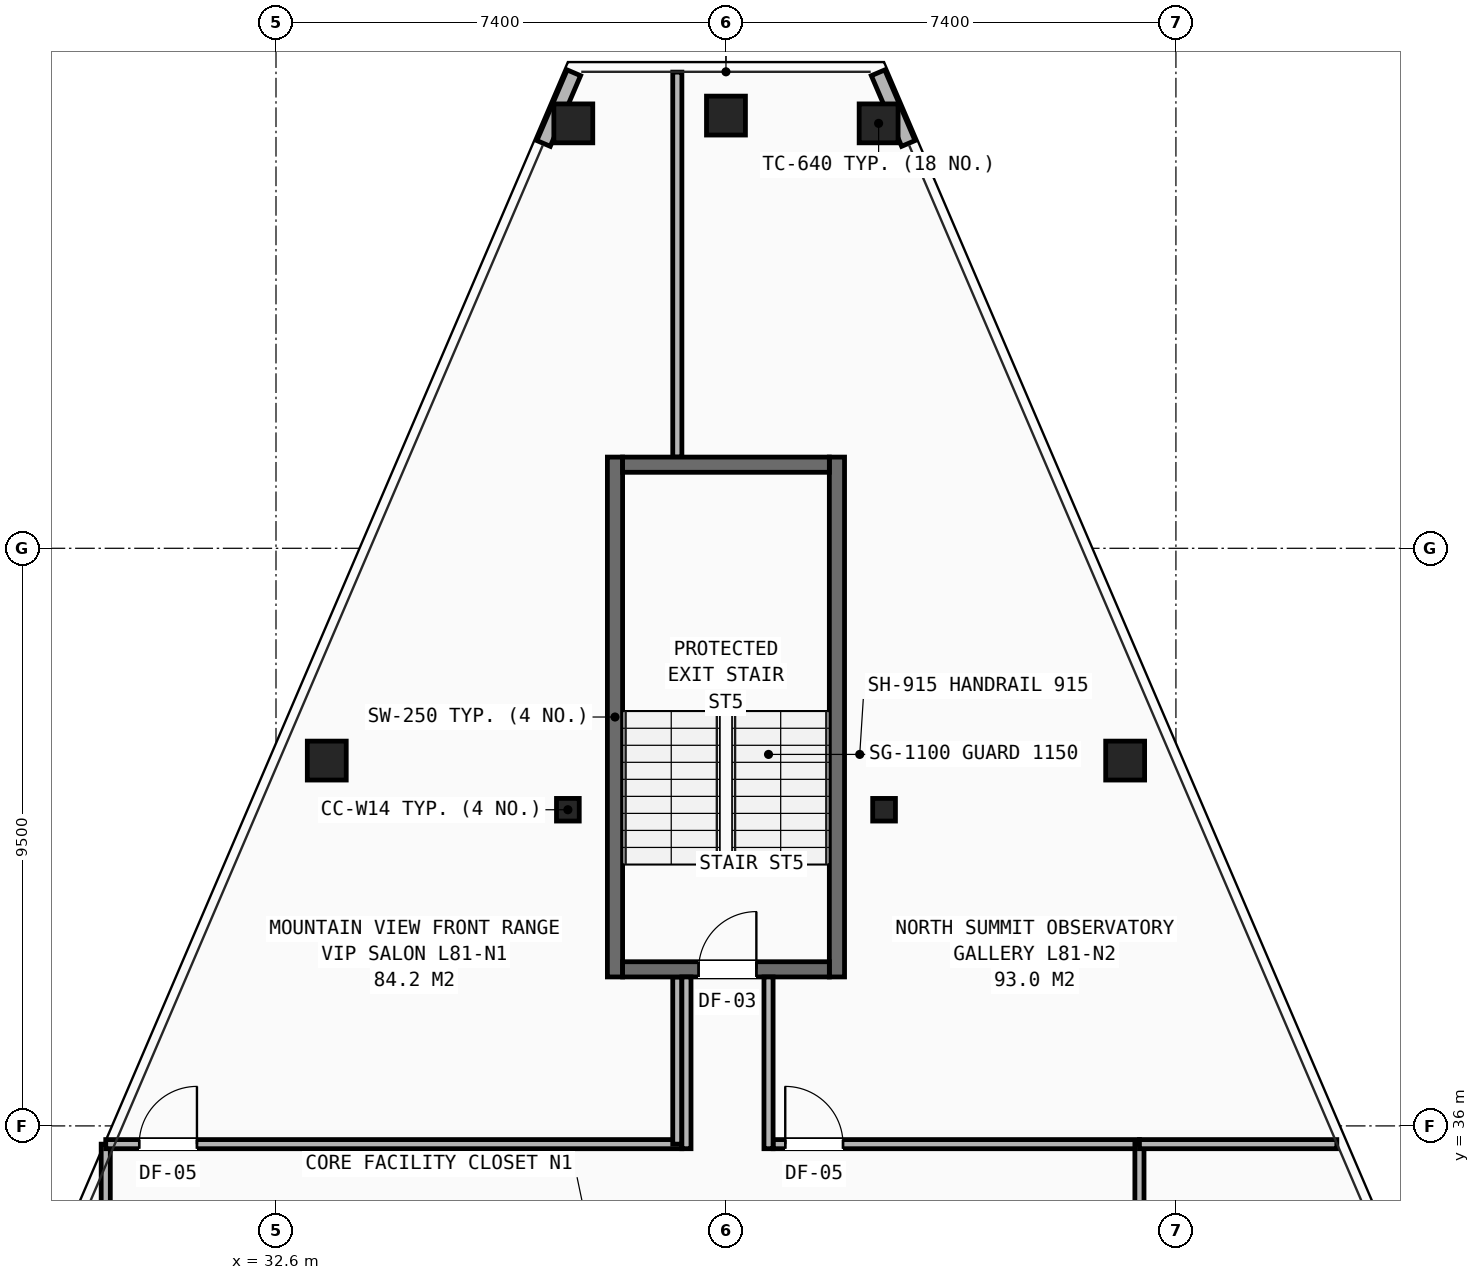
"""IFC4 building model, lengths in metres.
Left out: names, types, materials, properties, quantities, classifications, styles, units other than length and angle.
Written with IfcOpenShell. Run it as: python <this file> out.ifc"""

import sys

from ifc_helpers import new_model, si_unit, direction, frame, frame_2d, origin, origin_2d, place, context, subcontext, project, spatial, rectangle, hollow_rectangle, i_section, extrude, element, fill, save


model = new_model("IFC4")
c1 = context("Model", 3, precision=1e-05, world=origin(), true_north=direction((0.0, 1.0)))
c2 = subcontext(c1, "Body", "Model", "MODEL_VIEW")
j1 = project(units=[si_unit("LENGTHUNIT", "METRE"), si_unit("PLANEANGLEUNIT", "RADIAN")], contexts=[c1])
p1 = place(None, origin())
s1 = spatial("IfcSite", under=j1, at=p1, CompositionType="ELEMENT")
p2 = place(p1, origin())
s2 = spatial("IfcBuilding", under=s1, at=p2, CompositionType="ELEMENT")
p3 = place(p2, frame((0.0, 0.0, 286.5)))
s3 = spatial("IfcBuildingStorey", under=s2, at=p3, CompositionType="ELEMENT", Elevation=286.5)
for number, where, z_axis, x_axis in (
    (1, (37.4, 41.2, 0.0), (0.0, 0.0, 1.0), (1.0, 0.0, 0.0)),
    (2, (42.6, 41.2, 0.0), (0.0, 0.0, 1.0), (1.0, 0.0, 0.0)),
):
    element("IfcColumn", number, at=place(p3, frame(where, z_axis=z_axis, x_axis=x_axis)), inside=s3, PredefinedType="COLUMN", context=c2, shape_type="SweptSolid", body=[
        extrude(i_section(OverallWidth=0.374, OverallDepth=0.372, WebThickness=0.016, FlangeThickness=0.026, at=origin_2d()), origin(), (0.0, 0.0, 1.0), 3.5),
    ])
for number, where, z_axis, x_axis in (
    (3, (42.51, 52.489, 0.0), (0.0, 0.0, 1.0), (1.0, 0.0, 0.0)),
    (4, (40.0, 52.617, 0.0), (0.0, 0.0, 1.0), (1.0, 0.0, 0.0)),
    (5, (37.49, 52.489, 0.0), (0.0, 0.0, 1.0), (1.0, 0.0, 0.0)),
    (6, (33.435, 42.009, 0.0), (0.0, 0.0, 1.0), (1.0, 0.0, 0.0)),
    (7, (46.565, 42.009, 0.0), (0.0, 0.0, 1.0), (1.0, 0.0, 0.0)),
):
    element("IfcColumn", number, at=place(p3, frame(where, z_axis=z_axis, x_axis=x_axis)), inside=s3, PredefinedType="COLUMN", context=c2, shape_type="SweptSolid", body=[
        extrude(hollow_rectangle(XDim=0.64, YDim=0.64, WallThickness=0.045, at=origin_2d()), origin(), (0.0, 0.0, 1.0), 3.5),
    ])
for number, where, z_axis, x_axis in (
    (8, (37.499, 53.321, 0.0), (0.0, 0.0, 1.0), (-0.394, -0.919, 0.0)),
    (9, (43.0, 52.158, 0.0), (0.0, 0.0, 1.0), (-0.394, 0.919, 0.0)),
):
    element("IfcWall", number, at=place(p3, frame(where, z_axis=z_axis, x_axis=x_axis)), inside=s3, PredefinedType="SHEAR", context=c2, shape_type="SweptSolid", body=[
        extrude(rectangle(XDim=1.265, YDim=0.24, at=frame_2d((0.632, 0.0))), origin(), (0.0, 0.0, 1.0), 2.573),
    ])
p4 = place(p3, frame((29.8, 16.4, 0.0), z_axis=(0.0, 0.0, 1.0), x_axis=(0.0, 1.0, 0.0)))
e10 = element("IfcWall", 10, at=p4, inside=s3, PredefinedType="PARTITIONING", context=c2, shape_type="SweptSolid", body=[
    extrude(rectangle(XDim=19.3, YDim=0.15, at=frame_2d((9.65, 0.0))), origin(), (0.0, 0.0, 1.0), 2.242),
])
p5 = place(p4, frame((0.35, 0.0, 0.0)))
e11 = element("IfcOpeningElement", 11, at=p5, cuts=e10, PredefinedType="OPENING", context=c2, shape_type="SweptSolid", body=[
    extrude(rectangle(XDim=0.95, YDim=2.1, at=frame_2d((0.475, 1.05))), frame((0.0, 0.085, 0.0), z_axis=(0.0, -1.0, 0.0), x_axis=(1.0, 0.0, 0.0)), (0.0, 0.0, 1.0), 0.17),
])
p6 = place(p4, frame((9.95, 0.0, 0.0)))
e12 = element("IfcOpeningElement", 12, at=p6, cuts=e10, PredefinedType="OPENING", context=c2, shape_type="SweptSolid", body=[
    extrude(rectangle(XDim=0.95, YDim=2.1, at=frame_2d((0.475, 1.05))), frame((0.0, 0.085, 0.0), z_axis=(0.0, -1.0, 0.0), x_axis=(1.0, 0.0, 0.0)), (0.0, 0.0, 1.0), 0.17),
])
p7 = place(p3, frame((29.8, 35.7, 0.0), z_axis=(0.0, 0.0, 1.0), x_axis=(1.0, 0.0, 0.0)))
e13 = element("IfcWall", 13, at=p7, inside=s3, PredefinedType="PARTITIONING", context=c2, shape_type="SweptSolid", body=[
    extrude(rectangle(XDim=9.475, YDim=0.15, at=frame_2d((4.737, 0.0))), origin(), (0.0, 0.0, 1.0), 2.578),
])
p8 = place(p7, frame((0.55, 0.0, 0.0)))
e14 = element("IfcOpeningElement", 14, at=p8, cuts=e13, PredefinedType="OPENING", context=c2, shape_type="SweptSolid", body=[
    extrude(rectangle(XDim=0.95, YDim=2.1, at=frame_2d((0.475, 1.05))), frame((0.0, 0.085, 0.0), z_axis=(0.0, -1.0, 0.0), x_axis=(1.0, 0.0, 0.0)), (0.0, 0.0, 1.0), 0.17),
])
p9 = place(p3, frame((40.775, 35.7, 0.0), z_axis=(0.0, 0.0, 1.0), x_axis=(1.0, 0.0, 0.0)))
e15 = element("IfcWall", 15, at=p9, inside=s3, PredefinedType="PARTITIONING", context=c2, shape_type="SweptSolid", body=[
    extrude(rectangle(XDim=6.025, YDim=0.15, at=frame_2d((3.013, 0.0))), origin(), (0.0, 0.0, 1.0), 2.783),
])
p10 = place(p9, frame((0.2, 0.0, 0.0)))
e16 = element("IfcOpeningElement", 16, at=p10, cuts=e15, PredefinedType="OPENING", context=c2, shape_type="SweptSolid", body=[
    extrude(rectangle(XDim=0.95, YDim=2.1, at=frame_2d((0.475, 1.05))), frame((0.0, 0.085, 0.0), z_axis=(0.0, -1.0, 0.0), x_axis=(1.0, 0.0, 0.0)), (0.0, 0.0, 1.0), 0.17),
])
p11 = place(p3, frame((46.8, 31.2, 0.0), z_axis=(0.0, 0.0, 1.0), x_axis=(0.0, 1.0, 0.0)))
e17 = element("IfcWall", 17, at=p11, inside=s3, PredefinedType="PARTITIONING", context=c2, shape_type="SweptSolid", body=[
    extrude(rectangle(XDim=4.5, YDim=0.15, at=frame_2d((2.25, 0.0))), origin(), (0.0, 0.0, 1.0), 2.655),
])
p12 = place(p3, frame((46.8, 35.7, 0.0), z_axis=(0.0, 0.0, 1.0), x_axis=(1.0, 0.0, 0.0)))
e18 = element("IfcWall", 18, at=p12, inside=s3, PredefinedType="PARTITIONING", context=c2, shape_type="SweptSolid", body=[
    extrude(rectangle(XDim=3.246, YDim=0.15, at=frame_2d((1.623, 0.0))), origin(), (0.0, 0.0, 1.0), 2.578),
])
p13 = place(p3, frame((39.2, 35.7, 0.0), z_axis=(0.0, 0.0, 1.0), x_axis=(0.0, 1.0, 0.0)))
e19 = element("IfcWall", 19, at=p13, inside=s3, PredefinedType="PARTITIONING", context=c2, shape_type="SweptSolid", body=[
    extrude(rectangle(XDim=2.75, YDim=0.15, at=frame_2d((1.375, 0.0))), origin(), (0.0, 0.0, 1.0), 3.2),
])
p14 = place(p3, frame((39.2, 47.0, 0.0), z_axis=(0.0, 0.0, 1.0), x_axis=(0.0, 1.0, 0.0)))
e20 = element("IfcWall", 20, at=p14, inside=s3, PredefinedType="PARTITIONING", context=c2, shape_type="SweptSolid", body=[
    extrude(rectangle(XDim=6.332, YDim=0.15, at=frame_2d((3.166, 0.0))), origin(), (0.0, 0.0, 1.0), 2.578),
])
for number, where, z_axis, x_axis in (
    (21, (38.175, 38.45, 0.0), (0.0, 0.0, 1.0), (0.0, 1.0, 0.0)),
    (22, (41.825, 38.45, 0.0), (0.0, 0.0, 1.0), (0.0, 1.0, 0.0)),
):
    element("IfcWall", number, at=place(p3, frame(where, z_axis=z_axis, x_axis=x_axis)), inside=s3, PredefinedType="SHEAR", context=c2, shape_type="SweptSolid", body=[
        extrude(rectangle(XDim=8.55, YDim=0.25, at=frame_2d((4.275, 0.0))), origin(), (0.0, 0.0, 1.0), 3.2),
    ])
p15 = place(p3, frame((38.3, 38.575, 0.0), z_axis=(0.0, 0.0, 1.0), x_axis=(1.0, 0.0, 0.0)))
e23 = element("IfcWall", 23, at=p15, inside=s3, PredefinedType="SHEAR", context=c2, shape_type="SweptSolid", body=[
    extrude(rectangle(XDim=3.4, YDim=0.25, at=frame_2d((1.7, 0.0))), origin(), (0.0, 0.0, 1.0), 3.2),
])
p16 = place(p15, frame((1.25, 0.0, 0.0)))
e24 = element("IfcOpeningElement", 24, at=p16, cuts=e23, PredefinedType="OPENING", context=c2, shape_type="SweptSolid", body=[
    extrude(rectangle(XDim=0.95, YDim=2.1, at=frame_2d((0.475, 1.05))), frame((0.0, 0.135, 0.0), z_axis=(0.0, -1.0, 0.0), x_axis=(1.0, 0.0, 0.0)), (0.0, 0.0, 1.0), 0.27),
])
p17 = place(p3, frame((38.3, 46.875, 0.0), z_axis=(0.0, 0.0, 1.0), x_axis=(1.0, 0.0, 0.0)))
e25 = element("IfcWall", 25, at=p17, inside=s3, PredefinedType="SHEAR", context=c2, shape_type="SweptSolid", body=[
    extrude(rectangle(XDim=3.4, YDim=0.25, at=frame_2d((1.7, 0.0))), origin(), (0.0, 0.0, 1.0), 3.2),
])
for number, where, z_axis, x_axis in (
    (26, (39.35, 35.625, 0.0), (0.0, 0.0, 1.0), (0.0, 1.0, 0.0)),
    (27, (40.7, 35.625, 0.0), (0.0, 0.0, 1.0), (0.0, 1.0, 0.0)),
):
    element("IfcWall", number, at=place(p3, frame(where, z_axis=z_axis, x_axis=x_axis)), inside=s3, PredefinedType="PARTITIONING", context=c2, shape_type="SweptSolid", body=[
        extrude(rectangle(XDim=2.825, YDim=0.15, at=frame_2d((1.413, 0.0))), origin(), (0.0, 0.0, 1.0), 3.2),
    ])
p18 = place(p8, origin())
e28 = element("IfcDoor", 28, at=p18, inside=s3, OperationType="SINGLE_SWING_RIGHT", PredefinedType="DOOR", context=c2, shape_type="SweptSolid", body=[
    extrude(rectangle(XDim=0.95, YDim=2.1, at=frame_2d((0.475, 1.05))), frame((0.0, 0.025, 0.0), z_axis=(0.0, -1.0, 0.0), x_axis=(1.0, 0.0, 0.0)), (0.0, 0.0, 1.0), 0.05),
])
fill(e14, e28)
p19 = place(p10, origin())
e29 = element("IfcDoor", 29, at=p19, inside=s3, OperationType="SINGLE_SWING_LEFT", PredefinedType="DOOR", context=c2, shape_type="SweptSolid", body=[
    extrude(rectangle(XDim=0.95, YDim=2.1, at=frame_2d((0.475, 1.05))), frame((0.0, 0.025, 0.0), z_axis=(0.0, -1.0, 0.0), x_axis=(1.0, 0.0, 0.0)), (0.0, 0.0, 1.0), 0.05),
])
fill(e16, e29)
p20 = place(p16, origin())
e30 = element("IfcDoor", 30, at=p20, inside=s3, OperationType="SINGLE_SWING_RIGHT", PredefinedType="DOOR", context=c2, shape_type="SweptSolid", body=[
    extrude(rectangle(XDim=0.95, YDim=2.1, at=frame_2d((0.475, 1.05))), frame((0.0, 0.025, 0.0), z_axis=(0.0, -1.0, 0.0), x_axis=(1.0, 0.0, 0.0)), (0.0, 0.0, 1.0), 0.05),
])
fill(e24, e30)
save(model, sys.argv[1])
